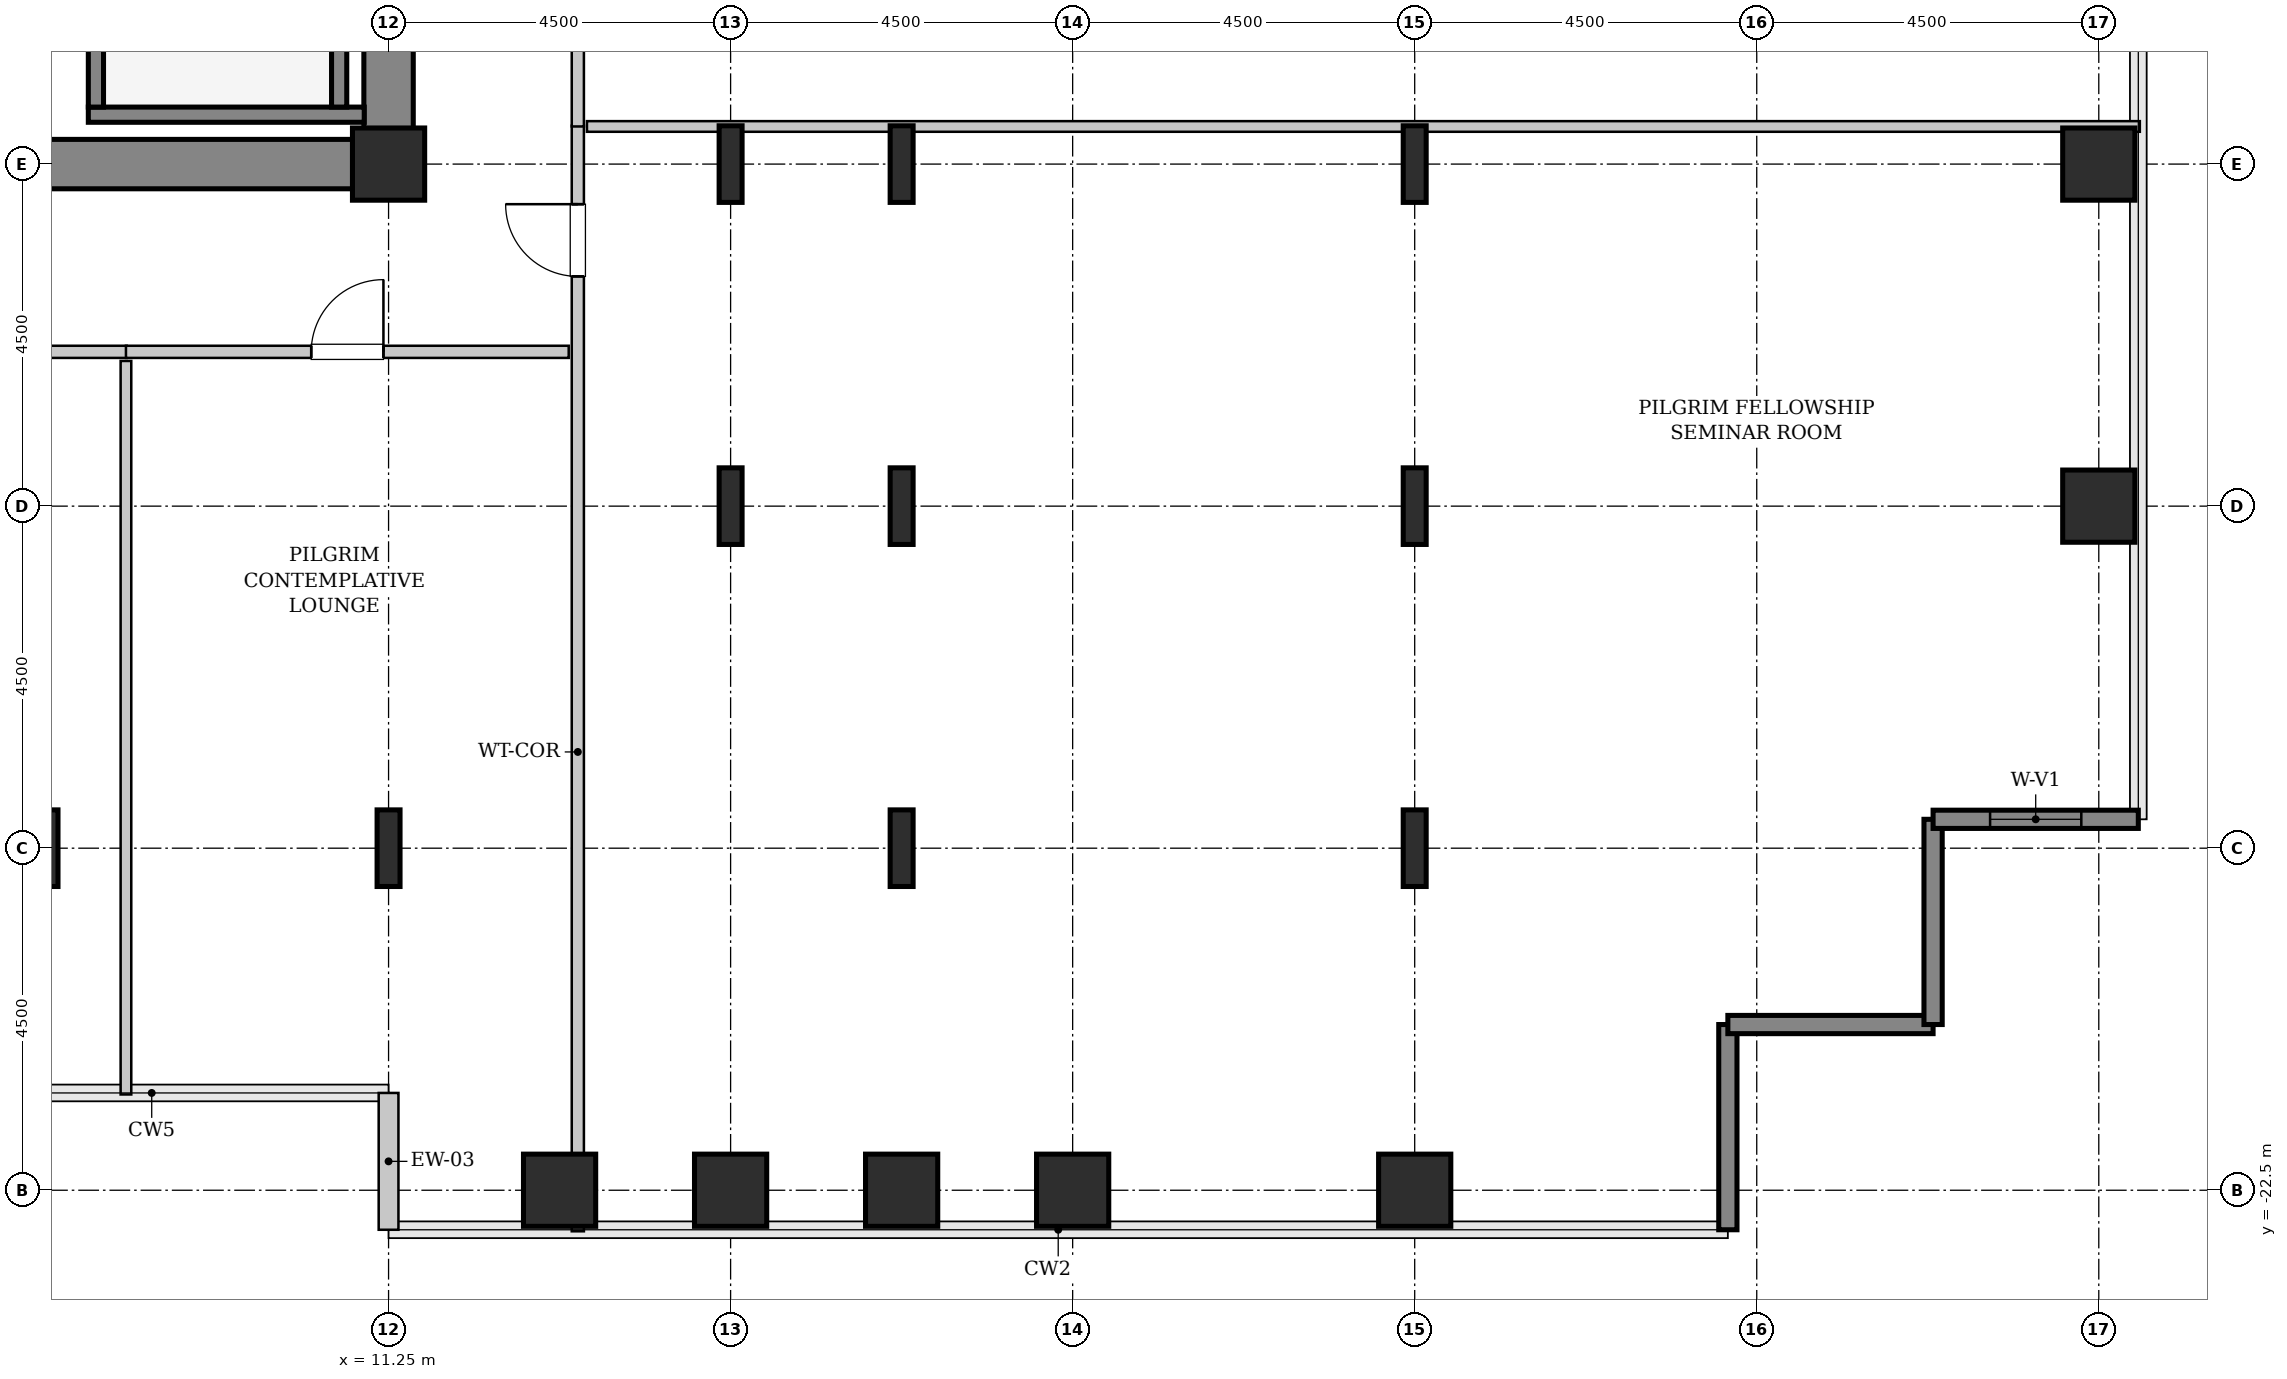
"""IFC4 building model, lengths in metres.
Left out: names, types, materials, properties, quantities, classifications, styles, units other than length and angle.
Written with IfcOpenShell. Run it as: python <this file> out.ifc"""

import sys

from ifc_helpers import new_model, si_unit, direction, frame, frame_2d, origin, origin_2d, place, context, subcontext, project, spatial, rectangle, hollow_rectangle, i_section, extrude, source, transform, mapped, element, fill, save


model = new_model("IFC4")
c1 = context("Model", 3, precision=1e-05, world=origin(), true_north=direction((0.0, 1.0)))
c2 = subcontext(c1, "Body", "Model", "MODEL_VIEW")
j1 = project(units=[si_unit("LENGTHUNIT", "METRE"), si_unit("PLANEANGLEUNIT", "RADIAN")], contexts=[c1])
p1 = place(None, origin())
s1 = spatial("IfcSite", under=j1, at=p1, CompositionType="ELEMENT")
p2 = place(p1, origin())
s2 = spatial("IfcBuilding", under=s1, at=p2, CompositionType="ELEMENT")
p3 = place(p2, frame((0.0, 0.0, 63.4)))
s3 = spatial("IfcBuildingStorey", under=s2, at=p3, CompositionType="ELEMENT", Elevation=63.4)
m1 = source(origin(), c2, "Body", "SweptSolid", [
    extrude(rectangle(XDim=10.025, YDim=0.65, at=frame_2d((5.012, 0.0))), origin(), (0.0, 0.0, 1.0), 3.8),
])
p4 = place(p3, frame((1.55, -9.0, 0.0), z_axis=(0.0, 0.0, 1.0), x_axis=(1.0, 0.0, 0.0)))
e1 = element("IfcWall", 1, at=p4, inside=s3, PredefinedType="SHEAR", context=c2, shape_type="MappedRepresentation", body=[
    mapped(m1, transform((0.0, 0.0, 0.0), x_axis=(1.0, 0.0, 0.0), y_axis=(0.0, 1.0, 0.0), z_axis=(0.0, 0.0, 1.0), scale=1.0)),
])
m2 = source(origin(), c2, "Body", "SweptSolid", [
    extrude(rectangle(XDim=7.325, YDim=0.65, at=frame_2d((3.663, 0.0))), origin(), (0.0, 0.0, 1.0), 3.8),
])
p5 = place(p3, frame((11.25, -8.675, 0.0), z_axis=(0.0, 0.0, 1.0), x_axis=(0.0, 1.0, 0.0)))
e2 = element("IfcWall", 2, at=p5, inside=s3, PredefinedType="SHEAR", context=c2, shape_type="MappedRepresentation", body=[
    mapped(m2, transform((0.0, 0.0, 0.0), x_axis=(1.0, 0.0, 0.0), y_axis=(0.0, 1.0, 0.0), z_axis=(0.0, 0.0, 1.0), scale=1.0)),
])
m3 = source(origin(), c2, "Body", "SweptSolid", [
    extrude(i_section(OverallWidth=0.302, OverallDepth=1.008, WebThickness=0.021, FlangeThickness=0.04, FilletRadius=0.03, at=origin_2d()), origin(), (0.0, 0.0, 1.0), 3.8),
])
for number, where, z_axis, x_axis in (
    (3, (6.75, -18.0, 0.0), (0.0, 0.0, 1.0), (1.0, 0.0, 0.0)),
    (4, (11.25, -18.0, 0.0), (0.0, 0.0, 1.0), (1.0, 0.0, 0.0)),
):
    element("IfcColumn", number, at=place(p3, frame(where, z_axis=z_axis, x_axis=x_axis)), inside=s3, PredefinedType="COLUMN", context=c2, shape_type="MappedRepresentation", body=[
        mapped(m3, transform((0.0, 0.0, 0.0), x_axis=(1.0, 0.0, 0.0), y_axis=(0.0, 1.0, 0.0), z_axis=(0.0, 0.0, 1.0), scale=1.0)),
    ])
m4 = source(origin(), c2, "Body", "SweptSolid", [
    extrude(hollow_rectangle(XDim=0.95, YDim=0.95, WallThickness=0.045, InnerFilletRadius=0.045, OuterFilletRadius=0.09, at=origin_2d()), origin(), (0.0, 0.0, 1.0), 3.8),
])
p6 = place(p3, frame((11.25, -9.0, 0.0), z_axis=(0.0, 0.0, 1.0), x_axis=(1.0, 0.0, 0.0)))
e5 = element("IfcColumn", 5, at=p6, inside=s3, PredefinedType="COLUMN", context=c2, shape_type="MappedRepresentation", body=[
    mapped(m4, transform((0.0, 0.0, 0.0), x_axis=(1.0, 0.0, 0.0), y_axis=(0.0, 1.0, 0.0), z_axis=(0.0, 0.0, 1.0), scale=1.0)),
])
m5 = source(origin(), c2, "Body", "SweptSolid", [
    extrude(hollow_rectangle(XDim=0.95, YDim=0.95, WallThickness=0.045, InnerFilletRadius=0.045, OuterFilletRadius=0.09, at=origin_2d()), origin(), (0.0, 0.0, 1.0), 3.8),
])
for number, where, z_axis, x_axis in (
    (6, (13.5, -22.5, 0.0), (0.0, 0.0, 1.0), (1.0, 0.0, 0.0)),
    (7, (15.75, -22.5, 0.0), (0.0, 0.0, 1.0), (1.0, 0.0, 0.0)),
):
    element("IfcColumn", number, at=place(p3, frame(where, z_axis=z_axis, x_axis=x_axis)), inside=s3, PredefinedType="COLUMN", context=c2, shape_type="MappedRepresentation", body=[
        mapped(m5, transform((0.0, 0.0, 0.0), x_axis=(1.0, 0.0, 0.0), y_axis=(0.0, 1.0, 0.0), z_axis=(0.0, 0.0, 1.0), scale=1.0)),
    ])
for number, where, z_axis, x_axis in (
    (8, (15.75, -13.5, 0.0), (0.0, 0.0, 1.0), (1.0, 0.0, 0.0)),
    (9, (15.75, -9.0, 0.0), (0.0, 0.0, 1.0), (1.0, 0.0, 0.0)),
):
    element("IfcColumn", number, at=place(p3, frame(where, z_axis=z_axis, x_axis=x_axis)), inside=s3, PredefinedType="COLUMN", context=c2, shape_type="MappedRepresentation", body=[
        mapped(m3, transform((0.0, 0.0, 0.0), x_axis=(1.0, 0.0, 0.0), y_axis=(0.0, 1.0, 0.0), z_axis=(0.0, 0.0, 1.0), scale=1.0)),
    ])
p7 = place(p3, frame((18.0, -22.5, 0.0), z_axis=(0.0, 0.0, 1.0), x_axis=(1.0, 0.0, 0.0)))
e10 = element("IfcColumn", 10, at=p7, inside=s3, PredefinedType="COLUMN", context=c2, shape_type="MappedRepresentation", body=[
    mapped(m5, transform((0.0, 0.0, 0.0), x_axis=(1.0, 0.0, 0.0), y_axis=(0.0, 1.0, 0.0), z_axis=(0.0, 0.0, 1.0), scale=1.0)),
])
for number, where, z_axis, x_axis in (
    (11, (18.0, -18.0, 0.0), (0.0, 0.0, 1.0), (1.0, 0.0, 0.0)),
    (12, (18.0, -13.5, 0.0), (0.0, 0.0, 1.0), (1.0, 0.0, 0.0)),
    (13, (18.0, -9.0, 0.0), (0.0, 0.0, 1.0), (1.0, 0.0, 0.0)),
):
    element("IfcColumn", number, at=place(p3, frame(where, z_axis=z_axis, x_axis=x_axis)), inside=s3, PredefinedType="COLUMN", context=c2, shape_type="MappedRepresentation", body=[
        mapped(m3, transform((0.0, 0.0, 0.0), x_axis=(1.0, 0.0, 0.0), y_axis=(0.0, 1.0, 0.0), z_axis=(0.0, 0.0, 1.0), scale=1.0)),
    ])
for number, where, z_axis, x_axis in (
    (14, (20.25, -22.5, 0.0), (0.0, 0.0, 1.0), (1.0, 0.0, 0.0)),
    (15, (24.75, -22.5, 0.0), (0.0, 0.0, 1.0), (1.0, 0.0, 0.0)),
):
    element("IfcColumn", number, at=place(p3, frame(where, z_axis=z_axis, x_axis=x_axis)), inside=s3, PredefinedType="COLUMN", context=c2, shape_type="MappedRepresentation", body=[
        mapped(m5, transform((0.0, 0.0, 0.0), x_axis=(1.0, 0.0, 0.0), y_axis=(0.0, 1.0, 0.0), z_axis=(0.0, 0.0, 1.0), scale=1.0)),
    ])
for number, where, z_axis, x_axis in (
    (16, (24.75, -18.0, 0.0), (0.0, 0.0, 1.0), (1.0, 0.0, 0.0)),
    (17, (24.75, -13.5, 0.0), (0.0, 0.0, 1.0), (1.0, 0.0, 0.0)),
    (18, (24.75, -9.0, 0.0), (0.0, 0.0, 1.0), (1.0, 0.0, 0.0)),
):
    element("IfcColumn", number, at=place(p3, frame(where, z_axis=z_axis, x_axis=x_axis)), inside=s3, PredefinedType="COLUMN", context=c2, shape_type="MappedRepresentation", body=[
        mapped(m3, transform((0.0, 0.0, 0.0), x_axis=(1.0, 0.0, 0.0), y_axis=(0.0, 1.0, 0.0), z_axis=(0.0, 0.0, 1.0), scale=1.0)),
    ])
for number, where, z_axis, x_axis in (
    (19, (33.75, -13.5, 0.0), (0.0, 0.0, 1.0), (1.0, 0.0, 0.0)),
    (20, (33.75, -9.0, 0.0), (0.0, 0.0, 1.0), (1.0, 0.0, 0.0)),
):
    element("IfcColumn", number, at=place(p3, frame(where, z_axis=z_axis, x_axis=x_axis)), inside=s3, PredefinedType="COLUMN", context=c2, shape_type="MappedRepresentation", body=[
        mapped(m5, transform((0.0, 0.0, 0.0), x_axis=(1.0, 0.0, 0.0), y_axis=(0.0, 1.0, 0.0), z_axis=(0.0, 0.0, 1.0), scale=1.0)),
    ])
m6 = source(origin(), c2, "Body", "SweptSolid", [
    extrude(rectangle(XDim=1.8, YDim=0.26, at=frame_2d((0.9, 0.0))), origin(), (0.0, 0.0, 1.0), 3.55),
])
p8 = place(p3, frame((11.25, -21.22, 0.0), z_axis=(0.0, 0.0, 1.0), x_axis=(0.0, -1.0, 0.0)))
e21 = element("IfcWall", 21, at=p8, inside=s3, PredefinedType="SOLIDWALL", context=c2, shape_type="MappedRepresentation", body=[
    mapped(m6, transform((0.0, 0.0, 0.0), x_axis=(1.0, 0.0, 0.0), y_axis=(0.0, 1.0, 0.0), z_axis=(0.0, 0.0, 1.0), scale=1.0)),
])
m7 = source(origin(), c2, "Body", "SweptSolid", [
    extrude(rectangle(XDim=2.7, YDim=0.24, at=frame_2d((1.35, 0.0))), origin(), (0.0, 0.0, 1.0), 3.55),
])
for number, where, z_axis, x_axis in (
    (22, (28.87, -23.02, 0.0), (0.0, 0.0, 1.0), (0.0, 1.0, 0.0)),
    (23, (28.87, -20.32, 0.0), (0.0, 0.0, 1.0), (1.0, 0.0, 0.0)),
    (24, (31.57, -20.32, 0.0), (0.0, 0.0, 1.0), (0.0, 1.0, 0.0)),
):
    element("IfcWall", number, at=place(p3, frame(where, z_axis=z_axis, x_axis=x_axis)), inside=s3, PredefinedType="SHEAR", context=c2, shape_type="MappedRepresentation", body=[
        mapped(m7, transform((0.0, 0.0, 0.0), x_axis=(1.0, 0.0, 0.0), y_axis=(0.0, 1.0, 0.0), z_axis=(0.0, 0.0, 1.0), scale=1.0)),
    ])
p9 = place(p3, frame((31.57, -17.62, 0.0), z_axis=(0.0, 0.0, 1.0), x_axis=(1.0, 0.0, 0.0)))
e25 = element("IfcWall", 25, at=p9, inside=s3, PredefinedType="SHEAR", context=c2, shape_type="MappedRepresentation", body=[
    mapped(m7, transform((0.0, 0.0, 0.0), x_axis=(1.0, 0.0, 0.0), y_axis=(0.0, 1.0, 0.0), z_axis=(0.0, 0.0, 1.0), scale=1.0)),
])
p10 = place(p9, frame((0.75, 0.0, 0.85)))
e26 = element("IfcOpeningElement", 26, at=p10, cuts=e25, PredefinedType="OPENING", context=c2, shape_type="SweptSolid", body=[
    extrude(rectangle(XDim=1.2, YDim=1.8, at=frame_2d((0.6, 0.9))), frame((0.0, 0.13, 0.0), z_axis=(0.0, -1.0, 0.0), x_axis=(1.0, 0.0, 0.0)), (0.0, 0.0, 1.0), 0.26),
])
m8 = source(origin(), c2, "Body", "SweptSolid", [
    extrude(rectangle(XDim=3.63, YDim=0.2, at=frame_2d((1.815, 0.0))), origin(), (0.0, 0.0, 1.0), 3.8),
])
p11 = place(p3, frame((7.3, -8.35, 0.0), z_axis=(0.0, 0.0, 1.0), x_axis=(1.0, 0.0, 0.0)))
e27 = element("IfcWall", 27, at=p11, inside=s3, PredefinedType="SOLIDWALL", context=c2, shape_type="MappedRepresentation", body=[
    mapped(m8, transform((0.0, 0.0, 0.0), x_axis=(1.0, 0.0, 0.0), y_axis=(0.0, 1.0, 0.0), z_axis=(0.0, 0.0, 1.0), scale=1.0)),
])
m9 = source(origin(), c2, "Body", "SweptSolid", [
    extrude(rectangle(XDim=7.1, YDim=0.2, at=frame_2d((3.55, 0.0))), origin(), (0.0, 0.0, 1.0), 3.8),
])
p12 = place(p3, frame((7.4, -1.15, 0.0), z_axis=(0.0, 0.0, 1.0), x_axis=(0.0, -1.0, 0.0)))
e28 = element("IfcWall", 28, at=p12, inside=s3, PredefinedType="SOLIDWALL", context=c2, shape_type="MappedRepresentation", body=[
    mapped(m9, transform((0.0, 0.0, 0.0), x_axis=(1.0, 0.0, 0.0), y_axis=(0.0, 1.0, 0.0), z_axis=(0.0, 0.0, 1.0), scale=1.0)),
])
p13 = place(p12, frame((0.18, 0.0, 0.0)))
e29 = element("IfcOpeningElement", 29, at=p13, cuts=e28, PredefinedType="OPENING", context=c2, shape_type="SweptSolid", body=[
    extrude(rectangle(XDim=1.1, YDim=2.15, at=frame_2d((0.55, 1.075))), frame((0.0, 0.11, 0.0), z_axis=(0.0, -1.0, 0.0), x_axis=(1.0, 0.0, 0.0)), (0.0, 0.0, 1.0), 0.22),
])
p14 = place(p3, frame((10.6, -1.15, 0.0), z_axis=(0.0, 0.0, 1.0), x_axis=(0.0, -1.0, 0.0)))
e30 = element("IfcWall", 30, at=p14, inside=s3, PredefinedType="SOLIDWALL", context=c2, shape_type="MappedRepresentation", body=[
    mapped(m9, transform((0.0, 0.0, 0.0), x_axis=(1.0, 0.0, 0.0), y_axis=(0.0, 1.0, 0.0), z_axis=(0.0, 0.0, 1.0), scale=1.0)),
])
m10 = source(origin(), c2, "Body", "SweptSolid", [
    extrude(rectangle(XDim=14.545, YDim=0.16, at=frame_2d((7.272, 0.0))), origin(), (0.0, 0.0, 1.0), 3.535),
])
p15 = place(p3, frame((13.74, -23.04, 0.0), z_axis=(0.0, 0.0, 1.0), x_axis=(0.0, 1.0, 0.0)))
e31 = element("IfcWall", 31, at=p15, inside=s3, PredefinedType="PARTITIONING", context=c2, shape_type="MappedRepresentation", body=[
    mapped(m10, transform((0.0, 0.0, 0.0), x_axis=(1.0, 0.0, 0.0), y_axis=(0.0, 1.0, 0.0), z_axis=(0.0, 0.0, 1.0), scale=1.0)),
])
p16 = place(p15, frame((12.562, 0.0, 0.0)))
e32 = element("IfcOpeningElement", 32, at=p16, cuts=e31, PredefinedType="OPENING", context=c2, shape_type="SweptSolid", body=[
    extrude(rectangle(XDim=0.95, YDim=2.1, at=frame_2d((0.475, 1.05))), frame((0.0, 0.09, 0.0), z_axis=(0.0, -1.0, 0.0), x_axis=(1.0, 0.0, 0.0)), (0.0, 0.0, 1.0), 0.18),
])
m11 = source(origin(), c2, "Body", "SweptSolid", [
    extrude(rectangle(XDim=20.43, YDim=0.14, at=frame_2d((10.215, 0.0))), origin(), (0.0, 0.0, 1.0), 2.825),
])
p17 = place(p3, frame((13.86, -8.505, 0.0), z_axis=(0.0, 0.0, 1.0), x_axis=(1.0, 0.0, 0.0)))
e33 = element("IfcWall", 33, at=p17, inside=s3, PredefinedType="PARTITIONING", context=c2, shape_type="MappedRepresentation", body=[
    mapped(m11, transform((0.0, 0.0, 0.0), x_axis=(1.0, 0.0, 0.0), y_axis=(0.0, 1.0, 0.0), z_axis=(0.0, 0.0, 1.0), scale=1.0)),
])
m12 = source(origin(), c2, "Body", "SweptSolid", [
    extrude(rectangle(XDim=3.31, YDim=0.16, at=frame_2d((1.655, 0.0))), origin(), (0.0, 0.0, 1.0), 3.535),
])
p18 = place(p3, frame((13.74, -8.505, 0.0), z_axis=(0.0, 0.0, 1.0), x_axis=(0.0, 1.0, 0.0)))
e34 = element("IfcWall", 34, at=p18, inside=s3, PredefinedType="PARTITIONING", context=c2, shape_type="MappedRepresentation", body=[
    mapped(m12, transform((0.0, 0.0, 0.0), x_axis=(1.0, 0.0, 0.0), y_axis=(0.0, 1.0, 0.0), z_axis=(0.0, 0.0, 1.0), scale=1.0)),
])
p19 = place(p18, frame((1.18, 0.0, 0.0)))
e35 = element("IfcOpeningElement", 35, at=p19, cuts=e34, PredefinedType="OPENING", context=c2, shape_type="SweptSolid", body=[
    extrude(rectangle(XDim=0.95, YDim=2.1, at=frame_2d((0.475, 1.05))), frame((0.0, 0.09, 0.0), z_axis=(0.0, -1.0, 0.0), x_axis=(1.0, 0.0, 0.0)), (0.0, 0.0, 1.0), 0.18),
])
m13 = source(origin(), c2, "Body", "SweptSolid", [
    extrude(rectangle(XDim=6.01, YDim=0.16, at=frame_2d((3.005, 0.0))), origin(), (0.0, 0.0, 1.0), 3.535),
])
p20 = place(p3, frame((1.795, -11.47, 0.0), z_axis=(0.0, 0.0, 1.0), x_axis=(1.0, 0.0, 0.0)))
e36 = element("IfcWall", 36, at=p20, inside=s3, PredefinedType="PARTITIONING", context=c2, shape_type="MappedRepresentation", body=[
    mapped(m13, transform((0.0, 0.0, 0.0), x_axis=(1.0, 0.0, 0.0), y_axis=(0.0, 1.0, 0.0), z_axis=(0.0, 0.0, 1.0), scale=1.0)),
])
p21 = place(p20, frame((2.53, 0.0, 0.0)))
e37 = element("IfcOpeningElement", 37, at=p21, cuts=e36, PredefinedType="OPENING", context=c2, shape_type="SweptSolid", body=[
    extrude(rectangle(XDim=0.95, YDim=2.1, at=frame_2d((0.475, 1.05))), frame((0.0, 0.09, 0.0), z_axis=(0.0, -1.0, 0.0), x_axis=(1.0, 0.0, 0.0)), (0.0, 0.0, 1.0), 0.18),
])
m14 = source(origin(), c2, "Body", "SweptSolid", [
    extrude(rectangle(XDim=9.65, YDim=0.14, at=frame_2d((4.825, 0.0))), origin(), (0.0, 0.0, 1.0), 3.535),
])
p22 = place(p3, frame((7.795, -21.24, 0.0), z_axis=(0.0, 0.0, 1.0), x_axis=(0.0, 1.0, 0.0)))
e38 = element("IfcWall", 38, at=p22, inside=s3, PredefinedType="PARTITIONING", context=c2, shape_type="MappedRepresentation", body=[
    mapped(m14, transform((0.0, 0.0, 0.0), x_axis=(1.0, 0.0, 0.0), y_axis=(0.0, 1.0, 0.0), z_axis=(0.0, 0.0, 1.0), scale=1.0)),
])
m15 = source(origin(), c2, "Body", "SweptSolid", [
    extrude(rectangle(XDim=5.825, YDim=0.16, at=frame_2d((2.913, 0.0))), origin(), (0.0, 0.0, 1.0), 3.535),
])
p23 = place(p3, frame((7.795, -11.47, 0.0), z_axis=(0.0, 0.0, 1.0), x_axis=(1.0, 0.0, 0.0)))
e39 = element("IfcWall", 39, at=p23, inside=s3, PredefinedType="PARTITIONING", context=c2, shape_type="MappedRepresentation", body=[
    mapped(m15, transform((0.0, 0.0, 0.0), x_axis=(1.0, 0.0, 0.0), y_axis=(0.0, 1.0, 0.0), z_axis=(0.0, 0.0, 1.0), scale=1.0)),
])
p24 = place(p23, frame((2.438, 0.0, 0.0)))
e40 = element("IfcOpeningElement", 40, at=p24, cuts=e39, PredefinedType="OPENING", context=c2, shape_type="SweptSolid", body=[
    extrude(rectangle(XDim=0.95, YDim=2.1, at=frame_2d((0.475, 1.05))), frame((0.0, 0.09, 0.0), z_axis=(0.0, -1.0, 0.0), x_axis=(1.0, 0.0, 0.0)), (0.0, 0.0, 1.0), 0.18),
])
m16 = source(origin(), c2, "Body", "SweptSolid", [
    extrude(rectangle(XDim=1.2, YDim=1.8, at=frame_2d((0.6, 0.9))), frame((0.0, 0.03, 0.0), z_axis=(0.0, -1.0, 0.0), x_axis=(1.0, 0.0, 0.0)), (0.0, 0.0, 1.0), 0.06),
])
p25 = place(p10, origin())
e41 = element("IfcWindow", 41, at=p25, inside=s3, PartitioningType="SINGLE_PANEL", PredefinedType="WINDOW", context=c2, shape_type="MappedRepresentation", body=[
    mapped(m16, transform((0.0, 0.0, 0.0), x_axis=(1.0, 0.0, 0.0), y_axis=(0.0, 1.0, 0.0), z_axis=(0.0, 0.0, 1.0), scale=1.0)),
])
fill(e26, e41)
m17 = source(origin(), c2, "Body", "SweptSolid", [
    extrude(rectangle(XDim=0.95, YDim=2.1, at=frame_2d((0.475, 1.05))), frame((0.0, 0.025, 0.0), z_axis=(0.0, -1.0, 0.0), x_axis=(1.0, 0.0, 0.0)), (0.0, 0.0, 1.0), 0.05),
])
p26 = place(p16, origin())
e42 = element("IfcDoor", 42, at=p26, inside=s3, OperationType="SINGLE_SWING_RIGHT", PredefinedType="DOOR", context=c2, shape_type="MappedRepresentation", body=[
    mapped(m17, transform((0.0, 0.0, 0.0), x_axis=(1.0, 0.0, 0.0), y_axis=(0.0, 1.0, 0.0), z_axis=(0.0, 0.0, 1.0), scale=1.0)),
])
fill(e32, e42)
p27 = place(p24, origin())
e43 = element("IfcDoor", 43, at=p27, inside=s3, OperationType="SINGLE_SWING_RIGHT", PredefinedType="DOOR", context=c2, shape_type="MappedRepresentation", body=[
    mapped(m17, transform((0.0, 0.0, 0.0), x_axis=(1.0, 0.0, 0.0), y_axis=(0.0, 1.0, 0.0), z_axis=(0.0, 0.0, 1.0), scale=1.0)),
])
fill(e40, e43)
save(model, sys.argv[1])
